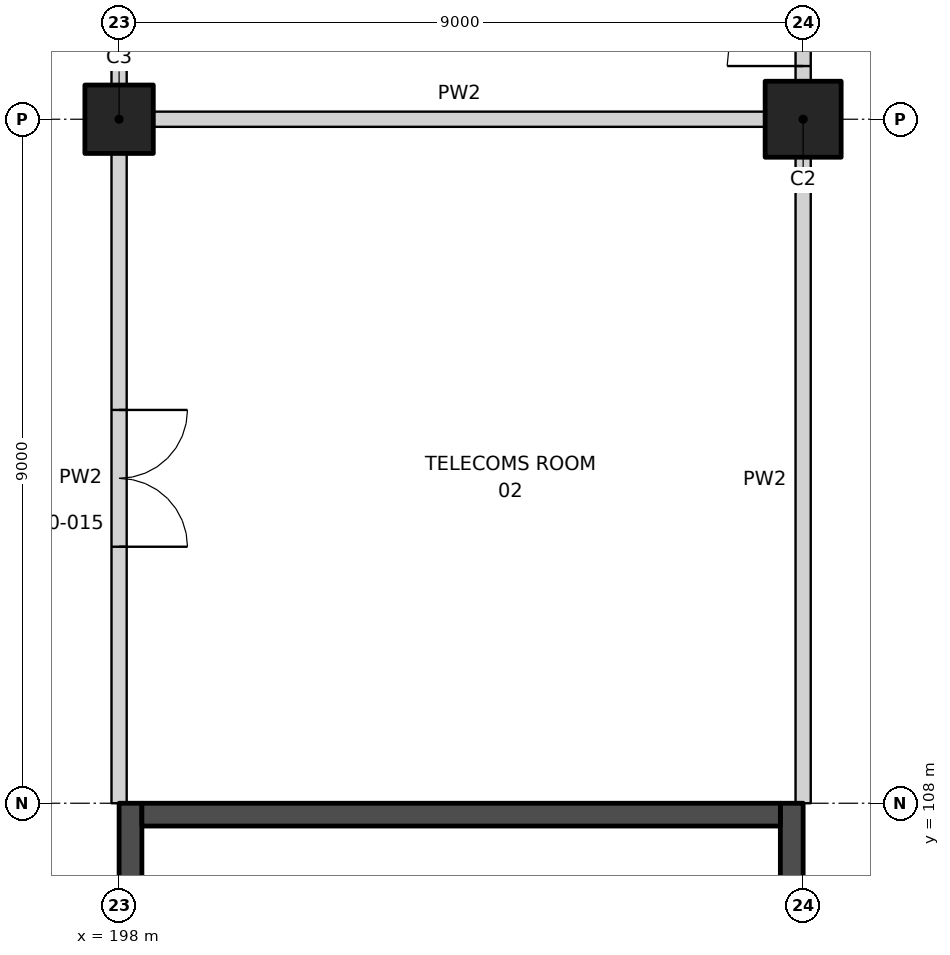
"""IFC4 building model, lengths in metres.
Left out: names, types, materials, properties, quantities, classifications, styles, units other than length and angle.
Written with IfcOpenShell. Run it as: python <this file> out.ifc"""

import sys

from ifc_helpers import new_model, si_unit, direction, frame, frame_2d, origin, origin_2d, place, context, subcontext, project, spatial, rectangle, extrude, element, fill, save


model = new_model("IFC4")
c1 = context("Model", 3, precision=1e-05, world=origin(), true_north=direction((0.0, 1.0)))
c2 = subcontext(c1, "Body", "Model", "MODEL_VIEW")
j1 = project(units=[si_unit("LENGTHUNIT", "METRE"), si_unit("PLANEANGLEUNIT", "RADIAN")], contexts=[c1])
p1 = place(None, origin())
s1 = spatial("IfcSite", under=j1, at=p1, CompositionType="ELEMENT")
p2 = place(p1, origin())
s2 = spatial("IfcBuilding", under=s1, at=p2, CompositionType="ELEMENT")
p3 = place(p2, origin())
s3 = spatial("IfcBuildingStorey", under=s2, at=p3, CompositionType="ELEMENT", Elevation=0.0)
p4 = place(p3, frame((207.0, 117.0, 0.0), z_axis=(0.0, 0.0, 1.0), x_axis=(1.0, 0.0, 0.0)))
e1 = element("IfcColumn", 1, at=p4, inside=s3, PredefinedType="COLUMN", context=c2, shape_type="SweptSolid", body=[
    extrude(rectangle(XDim=1.0, YDim=1.0, at=origin_2d()), origin(), (0.0, 0.0, 1.0), 7.0),
])
p5 = place(p3, frame((198.0, 117.0, 0.0), z_axis=(0.0, 0.0, 1.0), x_axis=(1.0, 0.0, 0.0)))
e2 = element("IfcColumn", 2, at=p5, inside=s3, PredefinedType="COLUMN", context=c2, shape_type="SweptSolid", body=[
    extrude(rectangle(XDim=0.9, YDim=0.9, at=origin_2d()), origin(), (0.0, 0.0, 1.0), 7.0),
])
p6 = place(p3, frame((198.45, 117.0, 0.0), z_axis=(0.0, 0.0, 1.0), x_axis=(1.0, 0.0, 0.0)))
e3 = element("IfcWall", 3, at=p6, inside=s3, PredefinedType="PARTITIONING", context=c2, shape_type="SweptSolid", body=[
    extrude(rectangle(XDim=8.05, YDim=0.2, at=frame_2d((4.025, 0.0))), origin(), (0.0, 0.0, 1.0), 5.75),
])
p7 = place(p3, frame((198.0, 108.0, 0.0), z_axis=(0.0, 0.0, 1.0), x_axis=(0.0, 1.0, 0.0)))
e4 = element("IfcWall", 4, at=p7, inside=s3, PredefinedType="PARTITIONING", context=c2, shape_type="SweptSolid", body=[
    extrude(rectangle(XDim=8.55, YDim=0.2, at=frame_2d((4.275, 0.0))), origin(), (0.0, 0.0, 1.0), 5.65),
])
p8 = place(p7, frame((3.375, 0.0, 0.0)))
e5 = element("IfcOpeningElement", 5, at=p8, cuts=e4, PredefinedType="OPENING", context=c2, shape_type="SweptSolid", body=[
    extrude(rectangle(XDim=1.8, YDim=2.1, at=frame_2d((0.9, 1.05))), frame((0.0, 0.11, 0.0), z_axis=(0.0, -1.0, 0.0), x_axis=(1.0, 0.0, 0.0)), (0.0, 0.0, 1.0), 0.22),
])
p9 = place(p3, frame((198.0, 117.45, 0.0), z_axis=(0.0, 0.0, 1.0), x_axis=(0.0, 1.0, 0.0)))
e6 = element("IfcWall", 6, at=p9, inside=s3, PredefinedType="PARTITIONING", context=c2, shape_type="SweptSolid", body=[
    extrude(rectangle(XDim=8.1, YDim=0.2, at=frame_2d((4.05, 0.0))), origin(), (0.0, 0.0, 1.0), 5.75),
])
p10 = place(p9, frame((3.55, 0.0, 0.0)))
e7 = element("IfcOpeningElement", 7, at=p10, cuts=e6, PredefinedType="OPENING", context=c2, shape_type="SweptSolid", body=[
    extrude(rectangle(XDim=1.0, YDim=2.1, at=frame_2d((0.5, 1.05))), frame((0.0, 0.11, 0.0), z_axis=(0.0, -1.0, 0.0), x_axis=(1.0, 0.0, 0.0)), (0.0, 0.0, 1.0), 0.22),
])
p11 = place(p3, frame((207.0, 108.0, 0.0), z_axis=(0.0, 0.0, 1.0), x_axis=(0.0, 1.0, 0.0)))
e8 = element("IfcWall", 8, at=p11, inside=s3, PredefinedType="PARTITIONING", context=c2, shape_type="SweptSolid", body=[
    extrude(rectangle(XDim=8.5, YDim=0.2, at=frame_2d((4.25, 0.0))), origin(), (0.0, 0.0, 1.0), 5.75),
])
p12 = place(p3, frame((207.0, 117.5, 0.0), z_axis=(0.0, 0.0, 1.0), x_axis=(0.0, 1.0, 0.0)))
e9 = element("IfcWall", 9, at=p12, inside=s3, PredefinedType="PARTITIONING", context=c2, shape_type="SweptSolid", body=[
    extrude(rectangle(XDim=8.0, YDim=0.2, at=frame_2d((4.0, 0.0))), origin(), (0.0, 0.0, 1.0), 5.75),
])
p13 = place(p12, frame((0.2, 0.0, 0.0)))
e10 = element("IfcOpeningElement", 10, at=p13, cuts=e9, PredefinedType="OPENING", context=c2, shape_type="SweptSolid", body=[
    extrude(rectangle(XDim=1.0, YDim=2.1, at=frame_2d((0.5, 1.05))), frame((0.0, 0.11, 0.0), z_axis=(0.0, -1.0, 0.0), x_axis=(1.0, 0.0, 0.0)), (0.0, 0.0, 1.0), 0.22),
])
p14 = place(p3, frame((198.15, 108.0, 0.0), z_axis=(0.0, 0.0, 1.0), x_axis=(0.0, -1.0, 0.0)))
e11 = element("IfcWall", 11, at=p14, inside=s3, PredefinedType="SHEAR", context=c2, shape_type="SweptSolid", body=[
    extrude(rectangle(XDim=18.0, YDim=0.3, at=frame_2d((9.0, 0.0))), origin(), (0.0, 0.0, 1.0), 7.0),
])
p15 = place(p14, frame((8.6, 0.0, 0.0)))
e12 = element("IfcOpeningElement", 12, at=p15, cuts=e11, PredefinedType="OPENING", context=c2, shape_type="SweptSolid", body=[
    extrude(rectangle(XDim=1.2, YDim=2.1, at=frame_2d((0.6, 1.05))), frame((0.0, 0.16, 0.0), z_axis=(0.0, -1.0, 0.0), x_axis=(1.0, 0.0, 0.0)), (0.0, 0.0, 1.0), 0.32),
])
p16 = place(p3, frame((206.85, 108.0, 0.0), z_axis=(0.0, 0.0, 1.0), x_axis=(0.0, -1.0, 0.0)))
e13 = element("IfcWall", 13, at=p16, inside=s3, PredefinedType="SHEAR", context=c2, shape_type="SweptSolid", body=[
    extrude(rectangle(XDim=18.0, YDim=0.3, at=frame_2d((9.0, 0.0))), origin(), (0.0, 0.0, 1.0), 7.0),
])
p17 = place(p3, frame((198.3, 107.85, 0.0), z_axis=(0.0, 0.0, 1.0), x_axis=(1.0, 0.0, 0.0)))
e14 = element("IfcWall", 14, at=p17, inside=s3, PredefinedType="SHEAR", context=c2, shape_type="SweptSolid", body=[
    extrude(rectangle(XDim=8.4, YDim=0.3, at=frame_2d((4.2, 0.0))), origin(), (0.0, 0.0, 1.0), 7.0),
])
p18 = place(p8, frame((1.8, 0.0, 0.0), z_axis=(0.0, 0.0, 1.0), x_axis=(-1.0, 0.0, 0.0)))
e15 = element("IfcDoor", 15, at=p18, inside=s3, OperationType="DOUBLE_DOOR_DOUBLE_SWING", PredefinedType="DOOR", context=c2, shape_type="SweptSolid", body=[
    extrude(rectangle(XDim=1.8, YDim=2.1, at=frame_2d((0.9, 1.05))), frame((0.0, 0.025, 0.0), z_axis=(0.0, -1.0, 0.0), x_axis=(1.0, 0.0, 0.0)), (0.0, 0.0, 1.0), 0.05),
])
fill(e5, e15)
p19 = place(p13, origin())
e16 = element("IfcDoor", 16, at=p19, inside=s3, OperationType="SINGLE_SWING_LEFT", PredefinedType="DOOR", context=c2, shape_type="SweptSolid", body=[
    extrude(rectangle(XDim=1.0, YDim=2.1, at=frame_2d((0.5, 1.05))), frame((0.0, 0.025, 0.0), z_axis=(0.0, -1.0, 0.0), x_axis=(1.0, 0.0, 0.0)), (0.0, 0.0, 1.0), 0.05),
])
fill(e10, e16)
save(model, sys.argv[1])
